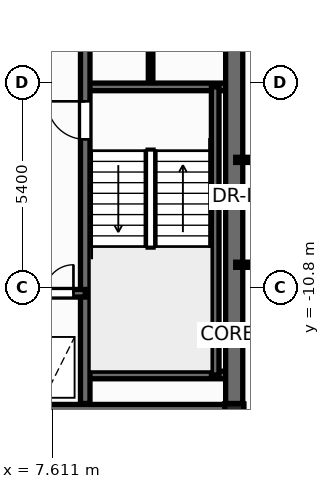
"""IFC4 building model, lengths in metres.
Left out: names, types, materials, properties, quantities, classifications, styles, units other than length and angle.
Written with IfcOpenShell. Run it as: python <this file> out.ifc"""

import sys

from ifc_helpers import new_model, si_unit, direction, frame, frame_2d, origin, origin_2d, place, context, subcontext, project, spatial, rectangle, i_section, extrude, element, fill, save


model = new_model("IFC4")
c1 = context("Model", 3, precision=1e-05, world=origin(), true_north=direction((0.0, 1.0)))
c2 = subcontext(c1, "Body", "Model", "MODEL_VIEW")
j1 = project(units=[si_unit("LENGTHUNIT", "METRE"), si_unit("PLANEANGLEUNIT", "RADIAN")], contexts=[c1])
p1 = place(None, origin())
s1 = spatial("IfcSite", under=j1, at=p1, CompositionType="ELEMENT")
p2 = place(p1, origin())
s2 = spatial("IfcBuilding", under=s1, at=p2, CompositionType="ELEMENT")
p3 = place(p2, frame((0.0, 0.0, 42.3)))
s3 = spatial("IfcBuildingStorey", under=s2, at=p3, CompositionType="ELEMENT", Elevation=42.3)
p4 = place(p3, frame((12.4, -14.1, 0.0), z_axis=(0.0, 0.0, 1.0), x_axis=(1.0, 0.0, 0.0)))
e1 = element("IfcColumn", 1, at=p4, inside=s3, PredefinedType="COLUMN", context=c2, shape_type="SweptSolid", body=[
    extrude(i_section(OverallWidth=0.5, OverallDepth=0.482, WebThickness=0.04, FlangeThickness=0.045, at=origin_2d()), origin(), (0.0, 0.0, 1.0), 3.6),
])
p5 = place(p3, frame((10.2, -5.52, 0.0), z_axis=(0.0, 0.0, 1.0), x_axis=(0.0, 1.0, 0.0)))
e2 = element("IfcWall", 2, at=p5, inside=s3, PredefinedType="PARTITIONING", context=c2, shape_type="SweptSolid", body=[
    extrude(rectangle(XDim=1.12, YDim=0.12, at=frame_2d((0.56, 0.0))), origin(), (0.0, 0.0, 1.0), 3.35),
])
p6 = place(p3, frame((-12.65, -14.1, 0.0), z_axis=(0.0, 0.0, 1.0), x_axis=(1.0, 0.0, 0.0)))
e3 = element("IfcWall", 3, at=p6, inside=s3, PredefinedType="SHEAR", context=c2, shape_type="SweptSolid", body=[
    extrude(rectangle(XDim=25.3, YDim=0.45, at=frame_2d((12.65, 0.0))), origin(), (0.0, 0.0, 1.0), 3.6),
])
for number, where, z_axis, x_axis in (
    (4, (8.48, -5.52, 0.0), (0.0, 0.0, 1.0), (1.0, 0.0, 0.0)),
    (5, (8.48, -13.1, 0.0), (0.0, 0.0, 1.0), (1.0, 0.0, 0.0)),
):
    element("IfcWall", number, at=place(p3, frame(where, z_axis=z_axis, x_axis=x_axis)), inside=s3, PredefinedType="SOLIDWALL", context=c2, shape_type="SweptSolid", body=[
        extrude(rectangle(XDim=3.87, YDim=0.2, at=frame_2d((1.935, 0.0))), origin(), (0.0, 0.0, 1.0), 3.6),
    ])
p7 = place(p3, frame((11.9, -13.1, 0.0), z_axis=(0.0, 0.0, 1.0), x_axis=(0.0, 1.0, 0.0)))
e6 = element("IfcWall", 6, at=p7, inside=s3, PredefinedType="SOLIDWALL", context=c2, shape_type="SweptSolid", body=[
    extrude(rectangle(XDim=7.58, YDim=0.2, at=frame_2d((3.79, 0.0))), origin(), (0.0, 0.0, 1.0), 3.6),
])
p8 = place(p3, frame((8.48, -13.85, 0.0), z_axis=(0.0, 0.0, 1.0), x_axis=(0.0, 1.0, 0.0)))
e7 = element("IfcWall", 7, at=p8, inside=s3, PredefinedType="SHEAR", context=c2, shape_type="SweptSolid", body=[
    extrude(rectangle(XDim=9.4, YDim=0.25, at=frame_2d((4.7, 0.0))), origin(), (0.0, 0.0, 1.0), 3.6),
])
p9 = place(p8, frame((6.95, 0.0, 0.0)))
e8 = element("IfcOpeningElement", 8, at=p9, cuts=e7, PredefinedType="OPENING", context=c2, shape_type="SweptSolid", body=[
    extrude(rectangle(XDim=1.006, YDim=2.104, at=frame_2d((0.5, 1.052))), frame((0.0, 0.135, 0.0), z_axis=(0.0, -1.0, 0.0), x_axis=(1.0, 0.0, 0.0)), (0.0, 0.0, 1.0), 0.27),
])
p10 = place(p3, frame((5.12, -10.95, 0.0), z_axis=(0.0, 0.0, 1.0), x_axis=(1.0, 0.0, 0.0)))
e9 = element("IfcWall", 9, at=p10, inside=s3, PredefinedType="SOLIDWALL", context=c2, shape_type="SweptSolid", body=[
    extrude(rectangle(XDim=3.36, YDim=0.2, at=frame_2d((1.68, 0.0))), origin(), (0.0, 0.0, 1.0), 3.6),
])
p11 = place(p10, frame((0.42, 0.0, 0.0)))
e10 = element("IfcOpeningElement", 10, at=p11, cuts=e9, PredefinedType="OPENING", context=c2, shape_type="SweptSolid", body=[
    extrude(rectangle(XDim=1.106, YDim=2.104, at=frame_2d((0.55, 1.052))), frame((0.0, 0.11, 0.0), z_axis=(0.0, -1.0, 0.0), x_axis=(1.0, 0.0, 0.0)), (0.0, 0.0, 1.0), 0.22),
])
p12 = place(p10, frame((2.3, 0.0, 0.0)))
e11 = element("IfcOpeningElement", 11, at=p12, cuts=e9, PredefinedType="OPENING", context=c2, shape_type="SweptSolid", body=[
    extrude(rectangle(XDim=0.756, YDim=2.054, at=frame_2d((0.375, 1.027))), frame((0.0, 0.11, 0.0), z_axis=(0.0, -1.0, 0.0), x_axis=(1.0, 0.0, 0.0)), (0.0, 0.0, 1.0), 0.22),
])
p13 = place(p3, frame((12.4, -13.85, 0.0), z_axis=(0.0, 0.0, 1.0), x_axis=(0.0, 1.0, 0.0)))
e12 = element("IfcWall", 12, at=p13, inside=s3, PredefinedType="SHEAR", context=c2, shape_type="SweptSolid", body=[
    extrude(rectangle(XDim=9.4, YDim=0.45, at=frame_2d((4.7, 0.0))), origin(), (0.0, 0.0, 1.0), 3.6),
])
p14 = place(p3, frame((12.44, -7.44, 0.0), z_axis=(0.0, 0.0, 1.0), x_axis=(1.0, 0.0, 0.0)))
e13 = element("IfcWall", 13, at=p14, inside=s3, PredefinedType="PARTITIONING", context=c2, shape_type="SweptSolid", body=[
    extrude(rectangle(XDim=2.638, YDim=0.135, at=frame_2d((1.319, 0.0))), origin(), (0.0, 0.0, 1.0), 2.713),
])
p15 = place(p14, frame((0.458, 0.0, 0.0)))
e14 = element("IfcOpeningElement", 14, at=p15, cuts=e13, PredefinedType="OPENING", context=c2, shape_type="SweptSolid", body=[
    extrude(rectangle(XDim=0.856, YDim=2.104, at=frame_2d((0.425, 1.052))), frame((0.0, 0.078, 0.0), z_axis=(0.0, -1.0, 0.0), x_axis=(1.0, 0.0, 0.0)), (0.0, 0.0, 1.0), 0.155),
])
p16 = place(p3, frame((12.44, -10.2, 0.0), z_axis=(0.0, 0.0, 1.0), x_axis=(1.0, 0.0, 0.0)))
e15 = element("IfcWall", 15, at=p16, inside=s3, PredefinedType="PARTITIONING", context=c2, shape_type="SweptSolid", body=[
    extrude(rectangle(XDim=2.72, YDim=0.135, at=frame_2d((1.36, 0.0))), origin(), (0.0, 0.0, 1.0), 2.713),
])
p17 = place(p9, origin())
e16 = element("IfcDoor", 16, at=p17, inside=s3, OperationType="SINGLE_SWING_RIGHT", PredefinedType="DOOR", context=c2, shape_type="SweptSolid", body=[
    extrude(rectangle(XDim=1.0, YDim=2.1, at=frame_2d((0.5, 1.05))), frame((0.0, 0.025, 0.0), z_axis=(0.0, -1.0, 0.0), x_axis=(1.0, 0.0, 0.0)), (0.0, 0.0, 1.0), 0.05),
])
fill(e8, e16)
p18 = place(p12, origin())
e17 = element("IfcDoor", 17, at=p18, inside=s3, OperationType="SINGLE_SWING_RIGHT", PredefinedType="DOOR", context=c2, shape_type="SweptSolid", body=[
    extrude(rectangle(XDim=0.75, YDim=2.05, at=frame_2d((0.375, 1.025))), frame((0.0, 0.025, 0.0), z_axis=(0.0, -1.0, 0.0), x_axis=(1.0, 0.0, 0.0)), (0.0, 0.0, 1.0), 0.05),
])
fill(e11, e17)
save(model, sys.argv[1])
